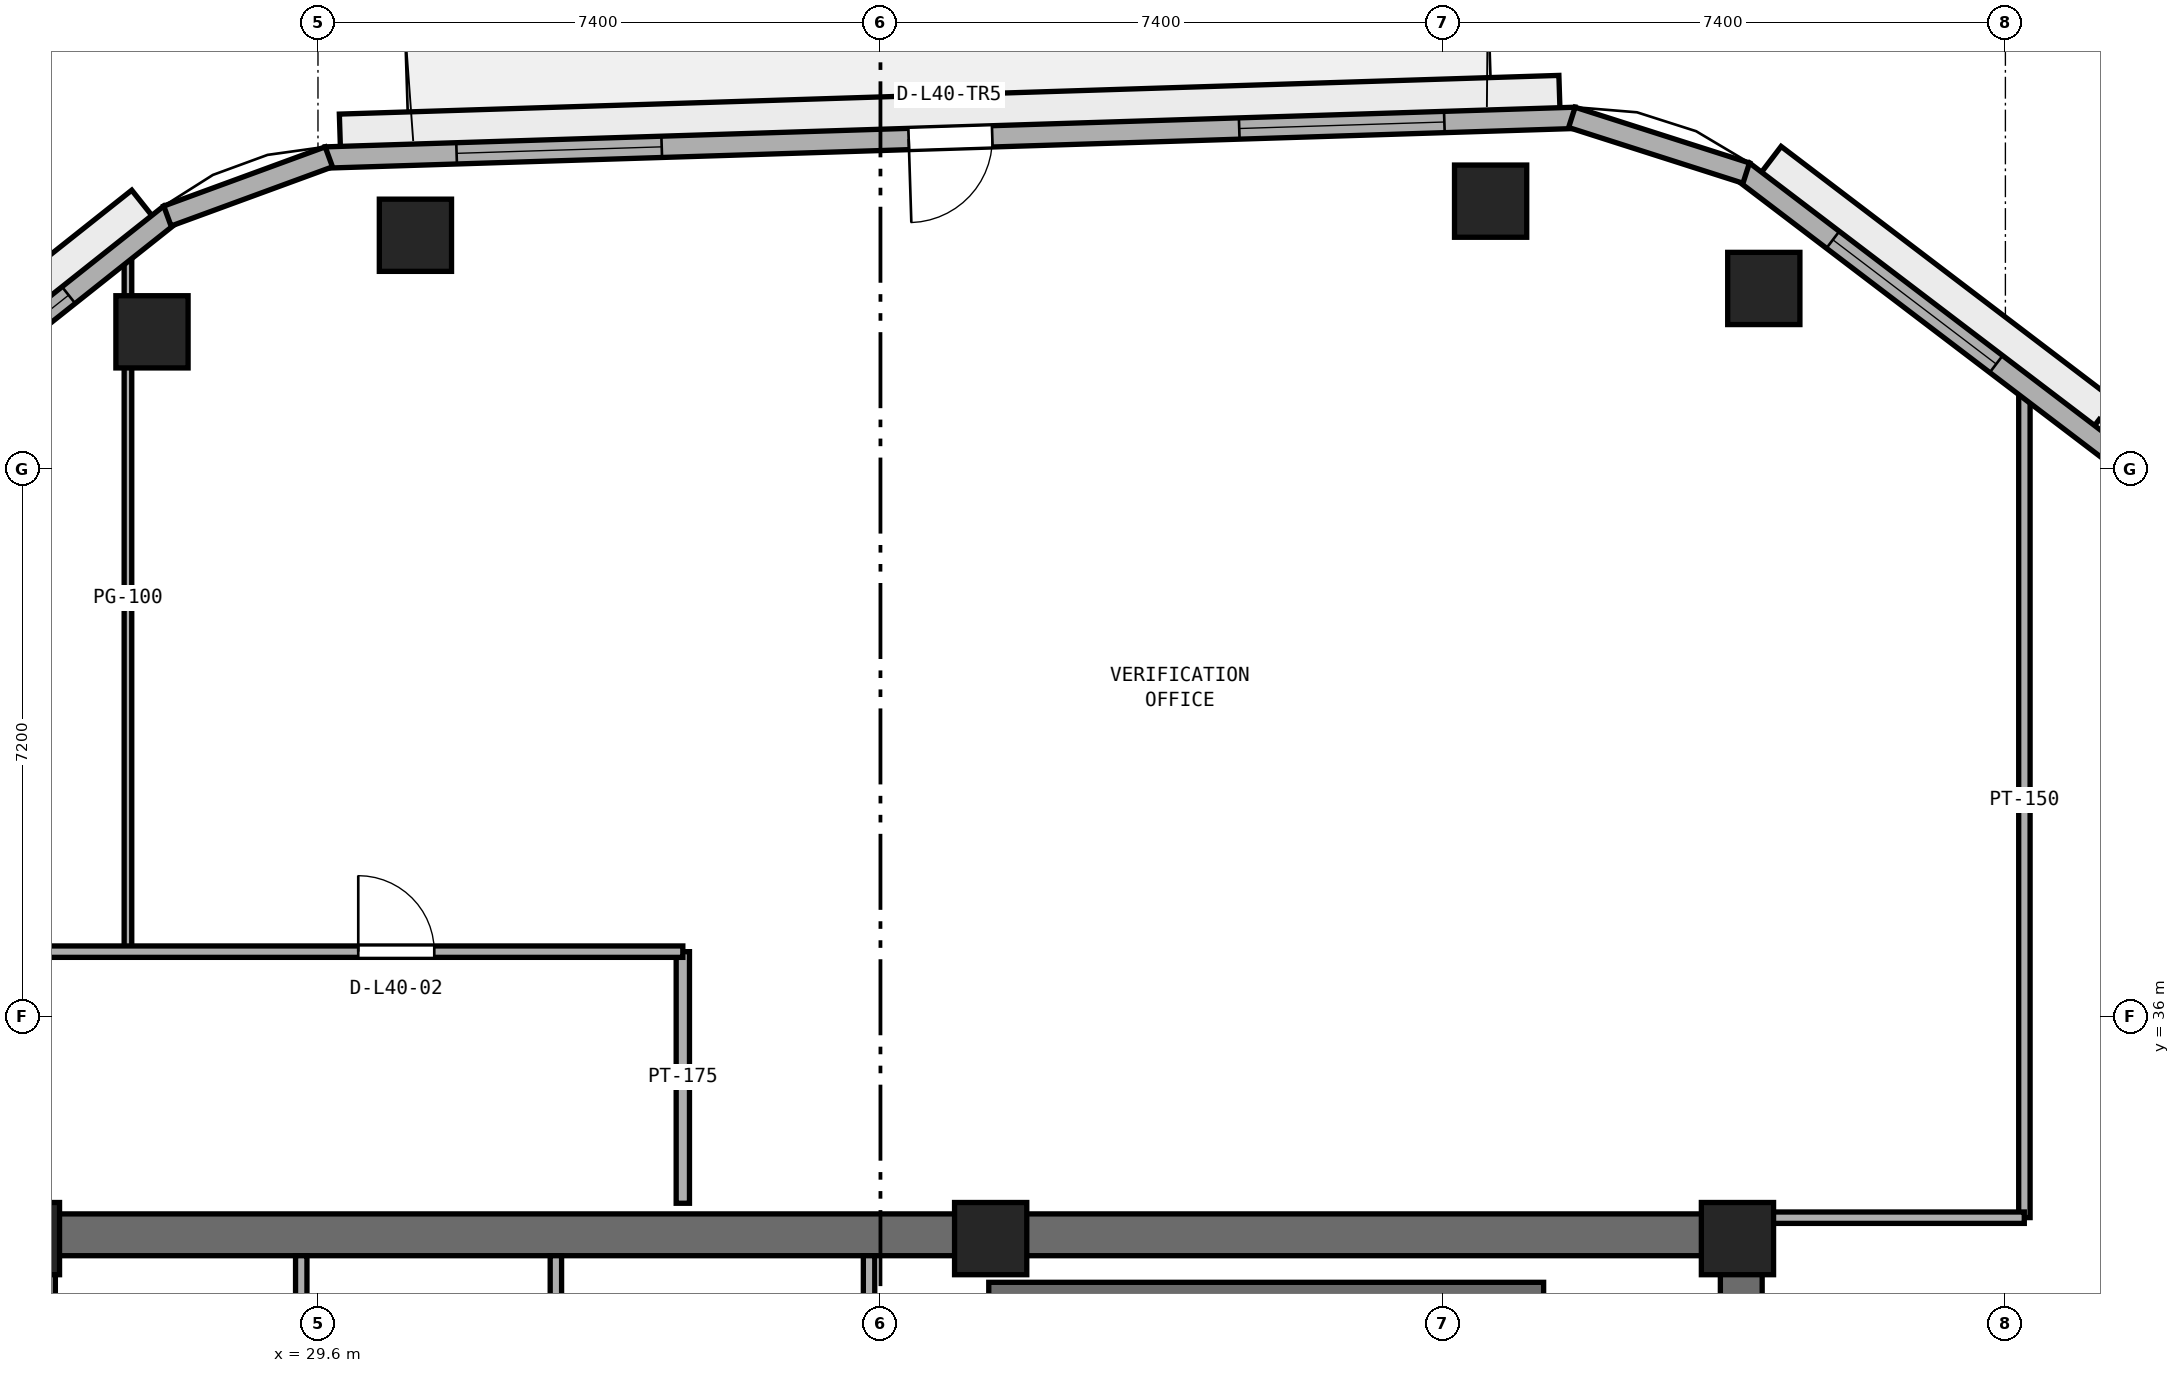
"""IFC4 building model, lengths in metres.
Left out: names, types, materials, properties, quantities, classifications, styles, units other than length and angle.
Written with IfcOpenShell. Run it as: python <this file> out.ifc"""

import sys

from ifc_helpers import new_model, si_unit, direction, frame, frame_2d, origin, origin_2d, place, context, subcontext, project, spatial, rectangle, extrude, element, fill, save


model = new_model("IFC4")
c1 = context("Model", 3, precision=1e-05, world=origin(), true_north=direction((0.0, 1.0)))
c2 = subcontext(c1, "Body", "Model", "MODEL_VIEW")
j1 = project(units=[si_unit("LENGTHUNIT", "METRE"), si_unit("PLANEANGLEUNIT", "RADIAN")], contexts=[c1])
p1 = place(None, origin())
s1 = spatial("IfcSite", under=j1, at=p1, CompositionType="ELEMENT")
p2 = place(p1, origin())
s2 = spatial("IfcBuilding", under=s1, at=p2, CompositionType="ELEMENT")
p3 = place(p2, frame((0.0, 0.0, 159.2)))
s3 = spatial("IfcBuildingStorey", under=s2, at=p3, CompositionType="ELEMENT", Elevation=159.2)
p4 = place(p3, frame((25.4, 33.125, 0.0), z_axis=(0.0, 0.0, 1.0), x_axis=(1.0, 0.0, 0.0)))
e1 = element("IfcWall", 1, at=p4, inside=s3, PredefinedType="SHEAR", context=c2, shape_type="SweptSolid", body=[
    extrude(rectangle(XDim=23.2, YDim=0.55, at=frame_2d((11.6, 0.0))), origin(), (0.0, 0.0, 1.0), 3.54),
])
p5 = place(p3, frame((48.325, 17.55, 0.0), z_axis=(0.0, 0.0, 1.0), x_axis=(0.0, 1.0, 0.0)))
e2 = element("IfcWall", 2, at=p5, inside=s3, PredefinedType="SHEAR", context=c2, shape_type="SweptSolid", body=[
    extrude(rectangle(XDim=15.3, YDim=0.55, at=frame_2d((7.65, 0.0))), origin(), (0.0, 0.0, 1.0), 3.54),
])
p6 = place(p5, frame((5.75, 0.0, 0.0)))
e3 = element("IfcOpeningElement", 3, at=p6, cuts=e2, PredefinedType="OPENING", context=c2, shape_type="SweptSolid", body=[
    extrude(rectangle(XDim=1.5, YDim=2.15, at=frame_2d((0.75, 1.075))), frame((0.0, 0.285, 0.0), z_axis=(0.0, -1.0, 0.0), x_axis=(1.0, 0.0, 0.0)), (0.0, 0.0, 1.0), 0.57),
])
for number, where, z_axis, x_axis in (
    (4, (48.275, 33.075, 0.0), (0.0, 0.0, 1.0), (1.0, 0.0, 0.0)),
    (5, (38.45, 33.075, 0.0), (0.0, 0.0, 1.0), (1.0, 0.0, 0.0)),
    (6, (25.725, 33.075, 0.0), (0.0, 0.0, 1.0), (1.0, 0.0, 0.0)),
):
    element("IfcColumn", number, at=place(p3, frame(where, z_axis=z_axis, x_axis=x_axis)), inside=s3, PredefinedType="PILASTER", context=c2, shape_type="SweptSolid", body=[
        extrude(rectangle(XDim=0.95, YDim=0.95, at=origin_2d()), origin(), (0.0, 0.0, 1.0), 3.8),
    ])
for number, where, z_axis, x_axis in (
    (7, (48.622, 45.575, 0.0), (0.0, 0.0, 1.0), (1.0, 0.0, 0.0)),
    (8, (45.028, 46.724, 0.0), (0.0, 0.0, 1.0), (1.0, 0.0, 0.0)),
    (9, (30.882, 46.275, 0.0), (0.0, 0.0, 1.0), (1.0, 0.0, 0.0)),
    (10, (27.416, 45.004, 0.0), (0.0, 0.0, 1.0), (1.0, 0.0, 0.0)),
):
    element("IfcColumn", number, at=place(p3, frame(where, z_axis=z_axis, x_axis=x_axis)), inside=s3, PredefinedType="COLUMN", context=c2, shape_type="SweptSolid", body=[
        extrude(rectangle(XDim=0.95, YDim=0.95, at=origin_2d()), origin(), (0.0, 0.0, 1.0), 3.8),
    ])
p7 = place(p3, frame((38.425, 32.375, 0.0), z_axis=(0.0, 0.0, 1.0), x_axis=(1.0, 0.0, 0.0)))
e11 = element("IfcWall", 11, at=p7, inside=s3, PredefinedType="SHEAR", context=c2, shape_type="SweptSolid", body=[
    extrude(rectangle(XDim=7.3, YDim=0.25, at=frame_2d((3.65, 0.0))), origin(), (0.0, 0.0, 1.0), 3.54),
])
p8 = place(p3, frame((26.07, 30.65, 0.0), z_axis=(0.0, 0.0, 1.0), x_axis=(0.0, 1.0, 0.0)))
e12 = element("IfcWall", 12, at=p8, inside=s3, PredefinedType="PARTITIONING", context=c2, shape_type="SweptSolid", body=[
    extrude(rectangle(XDim=2.2, YDim=0.15, at=frame_2d((1.1, 0.0))), origin(), (0.0, 0.0, 1.0), 2.64),
])
for number, where, z_axis, x_axis in (
    (13, (29.38, 30.65, 0.0), (0.0, 0.0, 1.0), (0.0, 1.0, 0.0)),
    (14, (32.73, 30.65, 0.0), (0.0, 0.0, 1.0), (0.0, 1.0, 0.0)),
    (15, (36.85, 30.65, 0.0), (0.0, 0.0, 1.0), (0.0, 1.0, 0.0)),
):
    element("IfcWall", number, at=place(p3, frame(where, z_axis=z_axis, x_axis=x_axis)), inside=s3, PredefinedType="PARTITIONING", context=c2, shape_type="SweptSolid", body=[
        extrude(rectangle(XDim=2.2, YDim=0.15, at=frame_2d((1.1, 0.0))), origin(), (0.0, 0.0, 1.0), 3.54),
    ])
p9 = place(p3, frame((52.05, 33.352, 0.0), z_axis=(0.0, 0.0, 1.0), x_axis=(0.0, 1.0, 0.0)))
e16 = element("IfcWall", 16, at=p9, inside=s3, PredefinedType="PARTITIONING", context=c2, shape_type="SweptSolid", body=[
    extrude(rectangle(XDim=10.983, YDim=0.15, at=frame_2d((5.491, 0.0))), origin(), (0.0, 0.0, 1.0), 3.54),
])
p10 = place(p3, frame((34.4, 33.54, 0.0), z_axis=(0.0, 0.0, 1.0), x_axis=(0.0, 1.0, 0.0)))
e17 = element("IfcWall", 17, at=p10, inside=s3, PredefinedType="PARTITIONING", context=c2, shape_type="SweptSolid", body=[
    extrude(rectangle(XDim=3.31, YDim=0.175, at=frame_2d((1.655, 0.0))), origin(), (0.0, 0.0, 1.0), 3.54),
])
p11 = place(p3, frame((27.1, 36.85, 0.0), z_axis=(0.0, 0.0, 1.0), x_axis=(0.0, 1.0, 0.0)))
e18 = element("IfcWall", 18, at=p11, inside=s3, PredefinedType="PARTITIONING", context=c2, shape_type="SweptSolid", body=[
    extrude(rectangle(XDim=9.295, YDim=0.1, at=frame_2d((4.648, 0.0))), origin(), (0.0, 0.0, 1.0), 3.54),
])
p12 = place(p3, frame((48.74, 33.35, 0.0), z_axis=(0.0, 0.0, 1.0), x_axis=(1.0, 0.0, 0.0)))
e19 = element("IfcWall", 19, at=p12, inside=s3, PredefinedType="PARTITIONING", context=c2, shape_type="SweptSolid", body=[
    extrude(rectangle(XDim=3.309, YDim=0.15, at=frame_2d((1.654, 0.0))), origin(), (0.0, 0.0, 1.0), 2.923),
])
p13 = place(p3, frame((21.95, 36.85, 0.0), z_axis=(0.0, 0.0, 1.0), x_axis=(1.0, 0.0, 0.0)))
e20 = element("IfcWall", 20, at=p13, inside=s3, PredefinedType="PARTITIONING", context=c2, shape_type="SweptSolid", body=[
    extrude(rectangle(XDim=12.45, YDim=0.15, at=frame_2d((6.225, 0.0))), origin(), (0.0, 0.0, 1.0), 3.54),
])
p14 = place(p13, frame((2.195, 0.0, 0.0)))
e21 = element("IfcOpeningElement", 21, at=p14, cuts=e20, PredefinedType="OPENING", context=c2, shape_type="SweptSolid", body=[
    extrude(rectangle(XDim=1.0, YDim=2.12, at=frame_2d((0.5, 1.06))), frame((0.0, 0.085, 0.0), z_axis=(0.0, -1.0, 0.0), x_axis=(1.0, 0.0, 0.0)), (0.0, 0.0, 1.0), 0.17),
])
p15 = place(p13, frame((8.18, 0.0, 0.0)))
e22 = element("IfcOpeningElement", 22, at=p15, cuts=e20, PredefinedType="OPENING", context=c2, shape_type="SweptSolid", body=[
    extrude(rectangle(XDim=1.0, YDim=2.12, at=frame_2d((0.5, 1.06))), frame((0.0, 0.085, 0.0), z_axis=(0.0, -1.0, 0.0), x_axis=(1.0, 0.0, 0.0)), (0.0, 0.0, 1.0), 0.17),
])
p16 = place(p3, frame((60.295, 38.025, 0.0), z_axis=(0.0, 0.0, 1.0), x_axis=(-0.795831760834, 0.605517801925, 0.0)))
e23 = element("IfcWall", 23, at=p16, inside=s3, PredefinedType="STANDARD", context=c2, shape_type="SweptSolid", body=[
    extrude(rectangle(XDim=15.012, YDim=0.28, at=frame_2d((7.506, 0.0))), origin(), (0.0, 0.0, 1.0), 3.54),
])
p17 = place(p16, frame((1.485, 0.0, 0.9)))
e24 = element("IfcOpeningElement", 24, at=p17, cuts=e23, PredefinedType="OPENING", context=c2, shape_type="SweptSolid", body=[
    extrude(rectangle(XDim=2.7, YDim=1.75, at=frame_2d((1.35, 0.875))), frame((0.0, 0.15, 0.0), z_axis=(0.0, -1.0, 0.0), x_axis=(1.0, 0.0, 0.0)), (0.0, 0.0, 1.0), 0.3),
])
p18 = place(p16, frame((6.156, 0.0, 0.9)))
e25 = element("IfcOpeningElement", 25, at=p18, cuts=e23, PredefinedType="OPENING", context=c2, shape_type="SweptSolid", body=[
    extrude(rectangle(XDim=2.7, YDim=1.75, at=frame_2d((1.35, 0.875))), frame((0.0, 0.15, 0.0), z_axis=(0.0, -1.0, 0.0), x_axis=(1.0, 0.0, 0.0)), (0.0, 0.0, 1.0), 0.3),
])
p19 = place(p16, frame((10.826, 0.0, 0.9)))
e26 = element("IfcOpeningElement", 26, at=p19, cuts=e23, PredefinedType="OPENING", context=c2, shape_type="SweptSolid", body=[
    extrude(rectangle(XDim=2.7, YDim=1.75, at=frame_2d((1.35, 0.875))), frame((0.0, 0.15, 0.0), z_axis=(0.0, -1.0, 0.0), x_axis=(1.0, 0.0, 0.0)), (0.0, 0.0, 1.0), 0.3),
])
p20 = place(p3, frame((46.143, 47.82, 0.0), z_axis=(0.0, 0.0, 1.0), x_axis=(-0.999497065256, -0.031711457627, 0.0)))
e27 = element("IfcWall", 27, at=p20, inside=s3, PredefinedType="STANDARD", context=c2, shape_type="SweptSolid", body=[
    extrude(rectangle(XDim=16.452, YDim=0.28, at=frame_2d((8.226, 0.0))), origin(), (0.0, 0.0, 1.0), 3.54),
])
p21 = place(p20, frame((7.676, 0.0, 0.0)))
e28 = element("IfcOpeningElement", 28, at=p21, cuts=e27, PredefinedType="OPENING", context=c2, shape_type="SweptSolid", body=[
    extrude(rectangle(XDim=1.1, YDim=2.2, at=frame_2d((0.55, 1.1))), frame((0.0, 0.15, 0.0), z_axis=(0.0, -1.0, 0.0), x_axis=(1.0, 0.0, 0.0)), (0.0, 0.0, 1.0), 0.3),
])
p22 = place(p20, frame((1.725, 0.0, 0.9)))
e29 = element("IfcOpeningElement", 29, at=p22, cuts=e27, PredefinedType="OPENING", context=c2, shape_type="SweptSolid", body=[
    extrude(rectangle(XDim=2.7, YDim=1.75, at=frame_2d((1.35, 0.875))), frame((0.0, 0.15, 0.0), z_axis=(0.0, -1.0, 0.0), x_axis=(1.0, 0.0, 0.0)), (0.0, 0.0, 1.0), 0.3),
])
p23 = place(p20, frame((12.027, 0.0, 0.9)))
e30 = element("IfcOpeningElement", 30, at=p23, cuts=e27, PredefinedType="OPENING", context=c2, shape_type="SweptSolid", body=[
    extrude(rectangle(XDim=2.7, YDim=1.75, at=frame_2d((1.35, 0.875))), frame((0.0, 0.15, 0.0), z_axis=(0.0, -1.0, 0.0), x_axis=(1.0, 0.0, 0.0)), (0.0, 0.0, 1.0), 0.3),
])
p24 = place(p3, frame((27.658, 46.55, 0.0), z_axis=(0.0, 0.0, 1.0), x_axis=(-0.783266285861, -0.621686356158, 0.0)))
e31 = element("IfcWall", 31, at=p24, inside=s3, PredefinedType="STANDARD", context=c2, shape_type="SweptSolid", body=[
    extrude(rectangle(XDim=16.353, YDim=0.28, at=frame_2d((8.177, 0.0))), origin(), (0.0, 0.0, 1.0), 3.54),
])
p25 = place(p24, frame((1.709, 0.0, 0.9)))
e32 = element("IfcOpeningElement", 32, at=p25, cuts=e31, PredefinedType="OPENING", context=c2, shape_type="SweptSolid", body=[
    extrude(rectangle(XDim=2.7, YDim=1.75, at=frame_2d((1.35, 0.875))), frame((0.0, 0.15, 0.0), z_axis=(0.0, -1.0, 0.0), x_axis=(1.0, 0.0, 0.0)), (0.0, 0.0, 1.0), 0.3),
])
p26 = place(p24, frame((6.826, 0.0, 0.9)))
e33 = element("IfcOpeningElement", 33, at=p26, cuts=e31, PredefinedType="OPENING", context=c2, shape_type="SweptSolid", body=[
    extrude(rectangle(XDim=2.7, YDim=1.75, at=frame_2d((1.35, 0.875))), frame((0.0, 0.15, 0.0), z_axis=(0.0, -1.0, 0.0), x_axis=(1.0, 0.0, 0.0)), (0.0, 0.0, 1.0), 0.3),
])
p27 = place(p24, frame((11.944, 0.0, 0.9)))
e34 = element("IfcOpeningElement", 34, at=p27, cuts=e31, PredefinedType="OPENING", context=c2, shape_type="SweptSolid", body=[
    extrude(rectangle(XDim=2.7, YDim=1.75, at=frame_2d((1.35, 0.875))), frame((0.0, 0.15, 0.0), z_axis=(0.0, -1.0, 0.0), x_axis=(1.0, 0.0, 0.0)), (0.0, 0.0, 1.0), 0.3),
])
p28 = place(p3, frame((48.39, 47.093, 0.0), z_axis=(0.0, 0.0, 1.0), x_axis=(-0.952542948918, 0.304404222156, 0.0)))
e35 = element("IfcWall", 35, at=p28, inside=s3, PredefinedType="STANDARD", context=c2, shape_type="SweptSolid", body=[
    extrude(rectangle(XDim=2.408, YDim=0.28, at=frame_2d((1.204, 0.0))), origin(), (0.0, 0.0, 1.0), 3.54),
])
p29 = place(p3, frame((29.743, 47.306, 0.0), z_axis=(0.0, 0.0, 1.0), x_axis=(-0.93893328381, -0.344099242302, 0.0)))
e36 = element("IfcWall", 36, at=p29, inside=s3, PredefinedType="STANDARD", context=c2, shape_type="SweptSolid", body=[
    extrude(rectangle(XDim=2.262, YDim=0.28, at=frame_2d((1.131, 0.0))), origin(), (0.0, 0.0, 1.0), 3.54),
])
p30 = place(p15, origin())
e37 = element("IfcDoor", 37, at=p30, inside=s3, OperationType="SINGLE_SWING_LEFT", PredefinedType="DOOR", context=c2, shape_type="SweptSolid", body=[
    extrude(rectangle(XDim=1.0, YDim=2.12, at=frame_2d((0.5, 1.06))), frame((0.0, 0.025, 0.0), z_axis=(0.0, -1.0, 0.0), x_axis=(1.0, 0.0, 0.0)), (0.0, 0.0, 1.0), 0.05),
])
fill(e22, e37)
p31 = place(p19, origin())
e38 = element("IfcWindow", 38, at=p31, inside=s3, PartitioningType="SINGLE_PANEL", PredefinedType="WINDOW", context=c2, shape_type="SweptSolid", body=[
    extrude(rectangle(XDim=2.7, YDim=1.75, at=frame_2d((1.35, 0.875))), frame((0.0, 0.03, 0.0), z_axis=(0.0, -1.0, 0.0), x_axis=(1.0, 0.0, 0.0)), (0.0, 0.0, 1.0), 0.06),
])
fill(e26, e38)
p32 = place(p21, origin())
e39 = element("IfcDoor", 39, at=p32, inside=s3, OperationType="SINGLE_SWING_RIGHT", PredefinedType="DOOR", context=c2, shape_type="SweptSolid", body=[
    extrude(rectangle(XDim=1.1, YDim=2.2, at=frame_2d((0.55, 1.1))), frame((0.0, 0.025, 0.0), z_axis=(0.0, -1.0, 0.0), x_axis=(1.0, 0.0, 0.0)), (0.0, 0.0, 1.0), 0.05),
])
fill(e28, e39)
p33 = place(p22, origin())
e40 = element("IfcWindow", 40, at=p33, inside=s3, PartitioningType="SINGLE_PANEL", PredefinedType="WINDOW", context=c2, shape_type="SweptSolid", body=[
    extrude(rectangle(XDim=2.7, YDim=1.75, at=frame_2d((1.35, 0.875))), frame((0.0, 0.03, 0.0), z_axis=(0.0, -1.0, 0.0), x_axis=(1.0, 0.0, 0.0)), (0.0, 0.0, 1.0), 0.06),
])
fill(e29, e40)
p34 = place(p23, origin())
e41 = element("IfcWindow", 41, at=p34, inside=s3, PartitioningType="SINGLE_PANEL", PredefinedType="WINDOW", context=c2, shape_type="SweptSolid", body=[
    extrude(rectangle(XDim=2.7, YDim=1.75, at=frame_2d((1.35, 0.875))), frame((0.0, 0.03, 0.0), z_axis=(0.0, -1.0, 0.0), x_axis=(1.0, 0.0, 0.0)), (0.0, 0.0, 1.0), 0.06),
])
fill(e30, e41)
p35 = place(p25, origin())
e42 = element("IfcWindow", 42, at=p35, inside=s3, PartitioningType="SINGLE_PANEL", PredefinedType="WINDOW", context=c2, shape_type="SweptSolid", body=[
    extrude(rectangle(XDim=2.7, YDim=1.75, at=frame_2d((1.35, 0.875))), frame((0.0, 0.03, 0.0), z_axis=(0.0, -1.0, 0.0), x_axis=(1.0, 0.0, 0.0)), (0.0, 0.0, 1.0), 0.06),
])
fill(e32, e42)
save(model, sys.argv[1])
